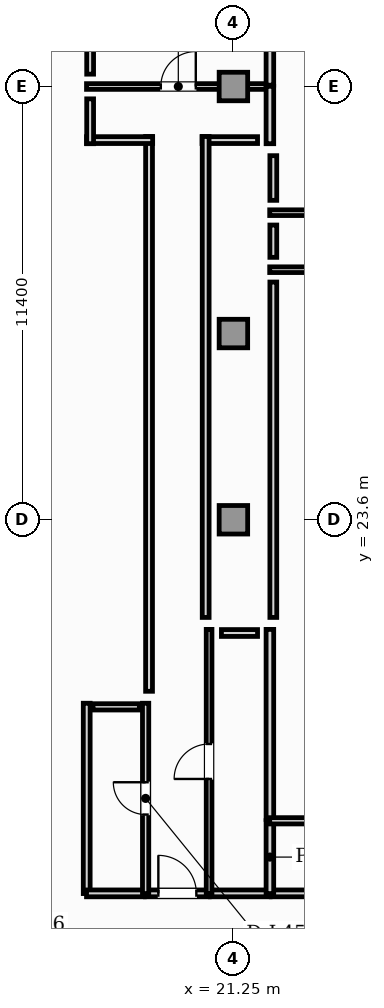
"""IFC4 building model, lengths in metres.
Left out: names, types, materials, properties, quantities, classifications, styles, units other than length and angle.
Written with IfcOpenShell. Run it as: python <this file> out.ifc"""

import sys

from ifc_helpers import new_model, si_unit, direction, frame, frame_2d, origin, origin_2d, place, context, subcontext, project, spatial, rectangle, extrude, element, fill, save


model = new_model("IFC4")
c1 = context("Model", 3, precision=1e-05, world=origin(), true_north=direction((0.0, 1.0)))
c2 = subcontext(c1, "Body", "Model", "MODEL_VIEW")
j1 = project(units=[si_unit("LENGTHUNIT", "METRE"), si_unit("PLANEANGLEUNIT", "RADIAN")], contexts=[c1])
p1 = place(None, origin())
s1 = spatial("IfcSite", under=j1, at=p1, CompositionType="ELEMENT")
p2 = place(p1, origin())
s2 = spatial("IfcBuilding", under=s1, at=p2, CompositionType="ELEMENT")
p3 = place(p2, frame((0.0, 0.0, 183.7)))
s3 = spatial("IfcBuildingStorey", under=s2, at=p3, CompositionType="ELEMENT", Elevation=183.7)
for number, where, z_axis, x_axis in (
    (1, (21.25, 23.6, 0.0), (0.0, 0.0, 1.0), (1.0, 0.0, 0.0)),
    (2, (21.25, 28.5, 0.0), (0.0, 0.0, 1.0), (1.0, 0.0, 0.0)),
    (3, (21.25, 35.0, 0.0), (0.0, 0.0, 1.0), (1.0, 0.0, 0.0)),
):
    element("IfcColumn", number, at=place(p3, frame(where, z_axis=z_axis, x_axis=x_axis)), inside=s3, PredefinedType="COLUMN", context=c2, shape_type="SweptSolid", body=[
        extrude(rectangle(XDim=0.75, YDim=0.75, at=origin_2d()), origin(), (0.0, 0.0, 1.0), 3.85),
    ])
p4 = place(p3, frame((18.935, 13.77, 0.0), z_axis=(0.0, 0.0, 1.0), x_axis=(1.0, 0.0, 0.0)))
e4 = element("IfcWall", 4, at=p4, inside=s3, PredefinedType="PARTITIONING", context=c2, shape_type="SweptSolid", body=[
    extrude(rectangle(XDim=1.68, YDim=0.18, at=frame_2d((0.84, 0.0))), origin(), (0.0, 0.0, 1.0), 3.63),
])
p5 = place(p4, frame((0.34, 0.0, 0.0)))
e5 = element("IfcOpeningElement", 5, at=p5, cuts=e4, PredefinedType="OPENING", context=c2, shape_type="SweptSolid", body=[
    extrude(rectangle(XDim=1.0, YDim=2.15, at=frame_2d((0.5, 1.075))), frame((0.0, 0.1, 0.0), z_axis=(0.0, -1.0, 0.0), x_axis=(1.0, 0.0, 0.0)), (0.0, 0.0, 1.0), 0.2),
])
p6 = place(p3, frame((17.39, 13.765, 0.0), z_axis=(0.0, 0.0, 1.0), x_axis=(0.0, 1.0, 0.0)))
e6 = element("IfcWall", 6, at=p6, inside=s3, PredefinedType="PARTITIONING", context=c2, shape_type="SweptSolid", body=[
    extrude(rectangle(XDim=5.008, YDim=0.18, at=frame_2d((2.504, 0.0))), origin(), (0.0, 0.0, 1.0), 3.63),
])
p7 = place(p3, frame((17.385, 13.77, 0.0), z_axis=(0.0, 0.0, 1.0), x_axis=(1.0, 0.0, 0.0)))
e7 = element("IfcWall", 7, at=p7, inside=s3, PredefinedType="PARTITIONING", context=c2, shape_type="SweptSolid", body=[
    extrude(rectangle(XDim=1.52, YDim=0.18, at=frame_2d((0.76, 0.0))), origin(), (0.0, 0.0, 1.0), 3.63),
])
p8 = place(p3, frame((20.645, 13.77, 0.0), z_axis=(0.0, 0.0, 1.0), x_axis=(1.0, 0.0, 0.0)))
e8 = element("IfcWall", 8, at=p8, inside=s3, PredefinedType="PARTITIONING", context=c2, shape_type="SweptSolid", body=[
    extrude(rectangle(XDim=1.57, YDim=0.18, at=frame_2d((0.785, 0.0))), origin(), (0.0, 0.0, 1.0), 3.63),
])
p9 = place(p3, frame((22.245, 13.77, 0.0), z_axis=(0.0, 0.0, 1.0), x_axis=(1.0, 0.0, 0.0)))
e9 = element("IfcWall", 9, at=p9, inside=s3, PredefinedType="PARTITIONING", context=c2, shape_type="SweptSolid", body=[
    extrude(rectangle(XDim=3.926, YDim=0.18, at=frame_2d((1.963, 0.0))), origin(), (0.0, 0.0, 1.0), 3.63),
])
p10 = place(p3, frame((18.94, 13.765, 0.0), z_axis=(0.0, 0.0, 1.0), x_axis=(0.0, 1.0, 0.0)))
e10 = element("IfcWall", 10, at=p10, inside=s3, PredefinedType="PLUMBINGWALL", context=c2, shape_type="SweptSolid", body=[
    extrude(rectangle(XDim=5.008, YDim=0.165, at=frame_2d((2.504, 0.0))), origin(), (0.0, 0.0, 1.0), 3.63),
])
p11 = place(p10, frame((2.079, 0.0, 0.0)))
e11 = element("IfcOpeningElement", 11, at=p11, cuts=e10, PredefinedType="OPENING", context=c2, shape_type="SweptSolid", body=[
    extrude(rectangle(XDim=0.85, YDim=2.1, at=frame_2d((0.425, 1.05))), frame((0.0, 0.093, 0.0), z_axis=(0.0, -1.0, 0.0), x_axis=(1.0, 0.0, 0.0)), (0.0, 0.0, 1.0), 0.185),
])
p12 = place(p3, frame((20.61, 13.765, 0.0), z_axis=(0.0, 0.0, 1.0), x_axis=(0.0, 1.0, 0.0)))
e12 = element("IfcWall", 12, at=p12, inside=s3, PredefinedType="PARTITIONING", context=c2, shape_type="SweptSolid", body=[
    extrude(rectangle(XDim=6.951, YDim=0.15, at=frame_2d((3.475, 0.0))), origin(), (0.0, 0.0, 1.0), 3.63),
])
p13 = place(p12, frame((3.015, 0.0, 0.0)))
e13 = element("IfcOpeningElement", 13, at=p13, cuts=e12, PredefinedType="OPENING", context=c2, shape_type="SweptSolid", body=[
    extrude(rectangle(XDim=0.92, YDim=2.1, at=frame_2d((0.46, 1.05))), frame((0.0, 0.085, 0.0), z_axis=(0.0, -1.0, 0.0), x_axis=(1.0, 0.0, 0.0)), (0.0, 0.0, 1.0), 0.17),
])
p14 = place(p3, frame((17.385, 35.0, 0.0), z_axis=(0.0, 0.0, 1.0), x_axis=(1.0, 0.0, 0.0)))
e14 = element("IfcWall", 14, at=p14, inside=s3, PredefinedType="PARTITIONING", context=c2, shape_type="SweptSolid", body=[
    extrude(rectangle(XDim=4.83, YDim=0.15, at=frame_2d((2.415, 0.0))), origin(), (0.0, 0.0, 1.0), 3.013),
])
p15 = place(p14, frame((1.955, 0.0, 0.0)))
e15 = element("IfcOpeningElement", 15, at=p15, cuts=e14, PredefinedType="OPENING", context=c2, shape_type="SweptSolid", body=[
    extrude(rectangle(XDim=0.92, YDim=2.1, at=frame_2d((0.46, 1.05))), frame((0.0, 0.085, 0.0), z_axis=(0.0, -1.0, 0.0), x_axis=(1.0, 0.0, 0.0)), (0.0, 0.0, 1.0), 0.17),
])
p16 = place(p3, frame((22.21, 33.495, 0.0), z_axis=(0.0, 0.0, 1.0), x_axis=(0.0, 1.0, 0.0)))
e16 = element("IfcWall", 16, at=p16, inside=s3, PredefinedType="PARTITIONING", context=c2, shape_type="SweptSolid", body=[
    extrude(rectangle(XDim=1.51, YDim=0.2, at=frame_2d((0.755, 0.0))), origin(), (0.0, 0.0, 1.0), 3.63),
])
p17 = place(p3, frame((22.21, 13.765, 0.0), z_axis=(0.0, 0.0, 1.0), x_axis=(0.0, 1.0, 0.0)))
e17 = element("IfcWall", 17, at=p17, inside=s3, PredefinedType="PARTITIONING", context=c2, shape_type="SweptSolid", body=[
    extrude(rectangle(XDim=1.919, YDim=0.2, at=frame_2d((0.96, 0.0))), origin(), (0.0, 0.0, 1.0), 3.63),
])
p18 = place(p3, frame((22.21, 15.714, 0.0), z_axis=(0.0, 0.0, 1.0), x_axis=(0.0, 1.0, 0.0)))
e18 = element("IfcWall", 18, at=p18, inside=s3, PredefinedType="PARTITIONING", context=c2, shape_type="SweptSolid", body=[
    extrude(rectangle(XDim=5.001, YDim=0.2, at=frame_2d((2.5, 0.0))), origin(), (0.0, 0.0, 1.0), 3.63),
])
p19 = place(p3, frame((22.21, 35.035, 0.0), z_axis=(0.0, 0.0, 1.0), x_axis=(0.0, 1.0, 0.0)))
e19 = element("IfcWall", 19, at=p19, inside=s3, PredefinedType="PARTITIONING", context=c2, shape_type="SweptSolid", body=[
    extrude(rectangle(XDim=1.798, YDim=0.2, at=frame_2d((0.899, 0.0))), origin(), (0.0, 0.0, 1.0), 3.63),
])
p20 = place(p3, frame((22.205, 30.18, 0.0), z_axis=(0.0, 0.0, 1.0), x_axis=(1.0, 0.0, 0.0)))
e20 = element("IfcWall", 20, at=p20, inside=s3, PredefinedType="PARTITIONING", context=c2, shape_type="SweptSolid", body=[
    extrude(rectangle(XDim=4.006, YDim=0.15, at=frame_2d((2.003, 0.0))), origin(), (0.0, 0.0, 1.0), 3.63),
])
p21 = place(p3, frame((22.205, 31.68, 0.0), z_axis=(0.0, 0.0, 1.0), x_axis=(1.0, 0.0, 0.0)))
e21 = element("IfcWall", 21, at=p21, inside=s3, PredefinedType="PARTITIONING", context=c2, shape_type="SweptSolid", body=[
    extrude(rectangle(XDim=6.55, YDim=0.15, at=frame_2d((3.275, 0.0))), origin(), (0.0, 0.0, 1.0), 3.63),
])
p22 = place(p21, frame((2.815, 0.0, 0.0)))
e22 = element("IfcOpeningElement", 22, at=p22, cuts=e21, PredefinedType="OPENING", context=c2, shape_type="SweptSolid", body=[
    extrude(rectangle(XDim=0.92, YDim=2.1, at=frame_2d((0.46, 1.05))), frame((0.0, 0.085, 0.0), z_axis=(0.0, -1.0, 0.0), x_axis=(1.0, 0.0, 0.0)), (0.0, 0.0, 1.0), 0.17),
])
p23 = place(p3, frame((22.205, 15.679, 0.0), z_axis=(0.0, 0.0, 1.0), x_axis=(1.0, 0.0, 0.0)))
e23 = element("IfcWall", 23, at=p23, inside=s3, PredefinedType="PLUMBINGWALL", context=c2, shape_type="SweptSolid", body=[
    extrude(rectangle(XDim=4.006, YDim=0.165, at=frame_2d((2.003, 0.0))), origin(), (0.0, 0.0, 1.0), 3.63),
])
p24 = place(p3, frame((19.03, 19.087, 0.0), z_axis=(0.0, 0.0, 1.0), x_axis=(0.0, 1.0, 0.0)))
e24 = element("IfcWall", 24, at=p24, inside=s3, PredefinedType="PARTITIONING", context=c2, shape_type="SweptSolid", body=[
    extrude(rectangle(XDim=14.598, YDim=0.18, at=frame_2d((7.299, 0.0))), origin(), (0.0, 0.0, 1.0), 3.63),
])
p25 = place(p3, frame((19.125, 33.59, 0.0), z_axis=(0.0, 0.0, 1.0), x_axis=(-1.0, 0.0, 0.0)))
e25 = element("IfcWall", 25, at=p25, inside=s3, PredefinedType="PARTITIONING", context=c2, shape_type="SweptSolid", body=[
    extrude(rectangle(XDim=1.74, YDim=0.18, at=frame_2d((0.87, 0.0))), origin(), (0.0, 0.0, 1.0), 3.63),
])
p26 = place(p3, frame((17.48, 33.495, 0.0), z_axis=(0.0, 0.0, 1.0), x_axis=(0.0, 1.0, 0.0)))
e26 = element("IfcWall", 26, at=p26, inside=s3, PredefinedType="PARTITIONING", context=c2, shape_type="SweptSolid", body=[
    extrude(rectangle(XDim=1.18, YDim=0.18, at=frame_2d((0.59, 0.0))), origin(), (0.0, 0.0, 1.0), 3.63),
])
p27 = place(p3, frame((21.885, 33.59, 0.0), z_axis=(0.0, 0.0, 1.0), x_axis=(-1.0, 0.0, 0.0)))
e27 = element("IfcWall", 27, at=p27, inside=s3, PredefinedType="PARTITIONING", context=c2, shape_type="SweptSolid", body=[
    extrude(rectangle(XDim=1.46, YDim=0.18, at=frame_2d((0.73, 0.0))), origin(), (0.0, 0.0, 1.0), 3.63),
])
p28 = place(p3, frame((20.52, 33.685, 0.0), z_axis=(0.0, 0.0, 1.0), x_axis=(0.0, -1.0, 0.0)))
e28 = element("IfcWall", 28, at=p28, inside=s3, PredefinedType="PARTITIONING", context=c2, shape_type="SweptSolid", body=[
    extrude(rectangle(XDim=12.655, YDim=0.18, at=frame_2d((6.327, 0.0))), origin(), (0.0, 0.0, 1.0), 3.63),
])
p29 = place(p3, frame((17.555, 18.677, 0.0), z_axis=(0.0, 0.0, 1.0), x_axis=(1.0, 0.0, 0.0)))
e29 = element("IfcWall", 29, at=p29, inside=s3, PredefinedType="PLUMBINGWALL", context=c2, shape_type="SweptSolid", body=[
    extrude(rectangle(XDim=1.22, YDim=0.165, at=frame_2d((0.61, 0.0))), origin(), (0.0, 0.0, 1.0), 3.63),
])
p30 = place(p3, frame((20.935, 20.621, 0.0), z_axis=(0.0, 0.0, 1.0), x_axis=(1.0, 0.0, 0.0)))
e30 = element("IfcWall", 30, at=p30, inside=s3, PredefinedType="PARTITIONING", context=c2, shape_type="SweptSolid", body=[
    extrude(rectangle(XDim=0.95, YDim=0.18, at=frame_2d((0.475, 0.0))), origin(), (0.0, 0.0, 1.0), 3.63),
])
p31 = place(p3, frame((17.48, 35.325, 0.0), z_axis=(0.0, 0.0, 1.0), x_axis=(0.0, 1.0, 0.0)))
e31 = element("IfcWall", 31, at=p31, inside=s3, PredefinedType="PARTITIONING", context=c2, shape_type="SweptSolid", body=[
    extrude(rectangle(XDim=4.903, YDim=0.18, at=frame_2d((2.451, 0.0))), origin(), (0.0, 0.0, 1.0), 3.63),
])
p32 = place(p3, frame((22.3, 30.505, 0.0), z_axis=(0.0, 0.0, 1.0), x_axis=(0.0, 1.0, 0.0)))
e32 = element("IfcWall", 32, at=p32, inside=s3, PredefinedType="PARTITIONING", context=c2, shape_type="SweptSolid", body=[
    extrude(rectangle(XDim=0.85, YDim=0.18, at=frame_2d((0.425, 0.0))), origin(), (0.0, 0.0, 1.0), 3.63),
])
p33 = place(p3, frame((22.3, 21.031, 0.0), z_axis=(0.0, 0.0, 1.0), x_axis=(0.0, 1.0, 0.0)))
e33 = element("IfcWall", 33, at=p33, inside=s3, PredefinedType="PARTITIONING", context=c2, shape_type="SweptSolid", body=[
    extrude(rectangle(XDim=8.824, YDim=0.18, at=frame_2d((4.412, 0.0))), origin(), (0.0, 0.0, 1.0), 3.63),
])
p34 = place(p3, frame((22.3, 32.005, 0.0), z_axis=(0.0, 0.0, 1.0), x_axis=(0.0, 1.0, 0.0)))
e34 = element("IfcWall", 34, at=p34, inside=s3, PredefinedType="PARTITIONING", context=c2, shape_type="SweptSolid", body=[
    extrude(rectangle(XDim=1.175, YDim=0.18, at=frame_2d((0.588, 0.0))), origin(), (0.0, 0.0, 1.0), 3.63),
])
p35 = place(p5, origin())
e35 = element("IfcDoor", 35, at=p35, inside=s3, OperationType="SINGLE_SWING_LEFT", PredefinedType="DOOR", context=c2, shape_type="SweptSolid", body=[
    extrude(rectangle(XDim=1.0, YDim=2.15, at=frame_2d((0.5, 1.075))), frame((0.0, 0.025, 0.0), z_axis=(0.0, -1.0, 0.0), x_axis=(1.0, 0.0, 0.0)), (0.0, 0.0, 1.0), 0.05),
])
fill(e5, e35)
p36 = place(p11, origin())
e36 = element("IfcDoor", 36, at=p36, inside=s3, OperationType="SINGLE_SWING_RIGHT", PredefinedType="DOOR", context=c2, shape_type="SweptSolid", body=[
    extrude(rectangle(XDim=0.85, YDim=2.1, at=frame_2d((0.425, 1.05))), frame((0.0, 0.025, 0.0), z_axis=(0.0, -1.0, 0.0), x_axis=(1.0, 0.0, 0.0)), (0.0, 0.0, 1.0), 0.05),
])
fill(e11, e36)
p37 = place(p13, origin())
e37 = element("IfcDoor", 37, at=p37, inside=s3, OperationType="SINGLE_SWING_LEFT", PredefinedType="DOOR", context=c2, shape_type="SweptSolid", body=[
    extrude(rectangle(XDim=0.92, YDim=2.1, at=frame_2d((0.46, 1.05))), frame((0.0, 0.025, 0.0), z_axis=(0.0, -1.0, 0.0), x_axis=(1.0, 0.0, 0.0)), (0.0, 0.0, 1.0), 0.05),
])
fill(e13, e37)
p38 = place(p15, origin())
e38 = element("IfcDoor", 38, at=p38, inside=s3, OperationType="SINGLE_SWING_RIGHT", PredefinedType="DOOR", context=c2, shape_type="SweptSolid", body=[
    extrude(rectangle(XDim=0.92, YDim=2.1, at=frame_2d((0.46, 1.05))), frame((0.0, 0.025, 0.0), z_axis=(0.0, -1.0, 0.0), x_axis=(1.0, 0.0, 0.0)), (0.0, 0.0, 1.0), 0.05),
])
fill(e15, e38)
save(model, sys.argv[1])
